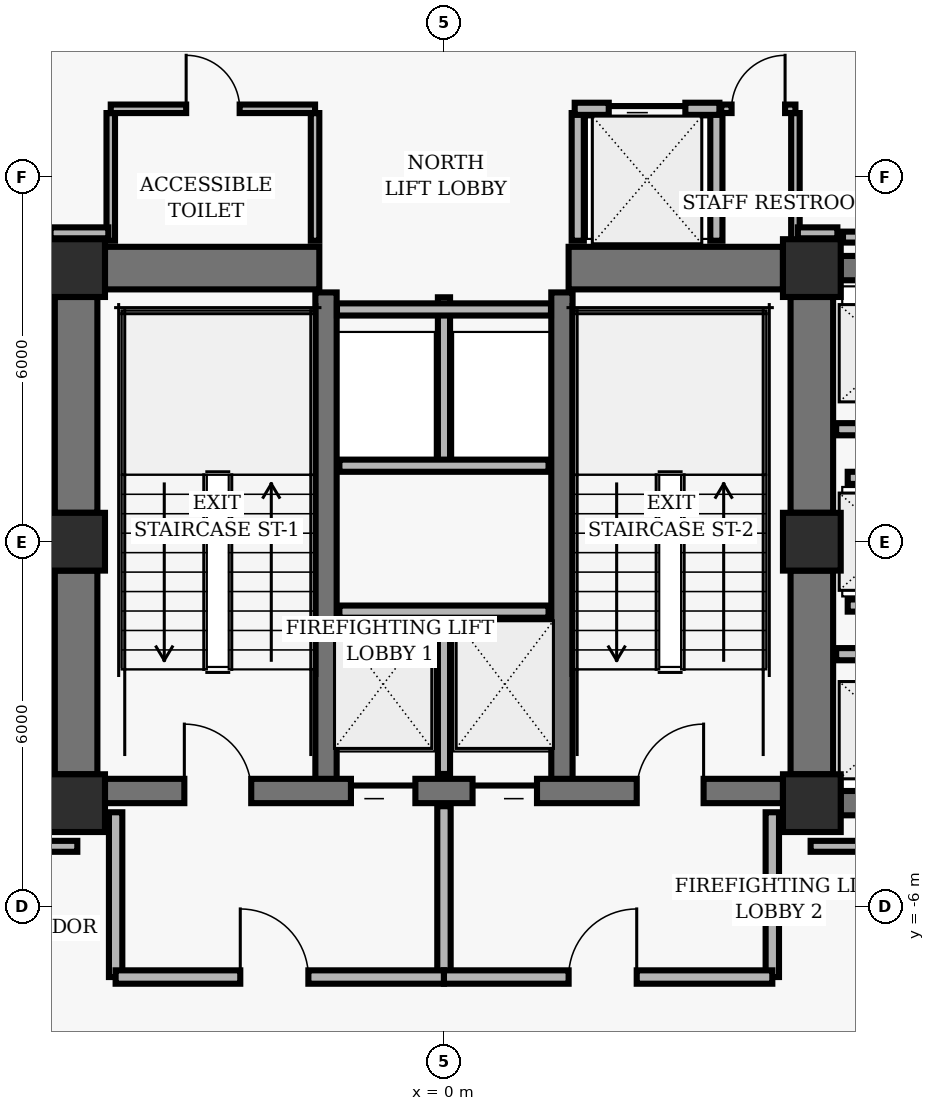
"""IFC4 building model, lengths in metres.
Left out: names, types, materials, properties, quantities, classifications, styles, units other than length and angle.
Written with IfcOpenShell. Run it as: python <this file> out.ifc"""

import sys

from ifc_helpers import new_model, si_unit, direction, frame, frame_2d, origin, origin_2d, place, context, subcontext, project, spatial, rectangle, hollow_rectangle, extrude, element, fill, save


model = new_model("IFC4")
c1 = context("Model", 3, precision=1e-05, world=origin(), true_north=direction((0.0, 1.0)))
c2 = subcontext(c1, "Body", "Model", "MODEL_VIEW")
j1 = project(units=[si_unit("LENGTHUNIT", "METRE"), si_unit("PLANEANGLEUNIT", "RADIAN")], contexts=[c1])
p1 = place(None, origin())
s1 = spatial("IfcSite", under=j1, at=p1, CompositionType="ELEMENT")
p2 = place(p1, origin())
s2 = spatial("IfcBuilding", under=s1, at=p2, CompositionType="ELEMENT")
p3 = place(p2, frame((0.0, 0.0, 100.8)))
s3 = spatial("IfcBuildingStorey", under=s2, at=p3, CompositionType="ELEMENT", Elevation=100.8)
for number, where, z_axis, x_axis in (
    (1, (-6.05, 4.5, 0.0), (0.0, 0.0, 1.0), (1.0, 0.0, 0.0)),
    (2, (6.05, 4.5, 0.0), (0.0, 0.0, 1.0), (1.0, 0.0, 0.0)),
    (3, (-6.05, 0.0, 0.0), (0.0, 0.0, 1.0), (1.0, 0.0, 0.0)),
    (4, (6.05, 0.0, 0.0), (0.0, 0.0, 1.0), (1.0, 0.0, 0.0)),
    (5, (-6.05, -4.3, 0.0), (0.0, 0.0, 1.0), (1.0, 0.0, 0.0)),
    (6, (6.05, -4.3, 0.0), (0.0, 0.0, 1.0), (1.0, 0.0, 0.0)),
):
    element("IfcColumn", number, at=place(p3, frame(where, z_axis=z_axis, x_axis=x_axis)), inside=s3, PredefinedType="COLUMN", context=c2, shape_type="SweptSolid", body=[
        extrude(hollow_rectangle(XDim=0.95, YDim=0.95, WallThickness=0.06, InnerFilletRadius=0.02, OuterFilletRadius=0.04, at=origin_2d()), origin(), (0.0, 0.0, 1.0), 3.84),
    ])
p4 = place(p3, frame((-6.05, 0.475, 0.0), z_axis=(0.0, 0.0, 1.0), x_axis=(0.0, 1.0, 0.0)))
e7 = element("IfcWall", 7, at=p4, inside=s3, PredefinedType="SHEAR", context=c2, shape_type="SweptSolid", body=[
    extrude(rectangle(XDim=3.55, YDim=0.7, at=frame_2d((1.775, 0.0))), origin(), (0.0, 0.0, 1.0), 3.418),
])
p5 = place(p3, frame((-6.05, -3.825, 0.0), z_axis=(0.0, 0.0, 1.0), x_axis=(0.0, 1.0, 0.0)))
e8 = element("IfcWall", 8, at=p5, inside=s3, PredefinedType="SHEAR", context=c2, shape_type="SweptSolid", body=[
    extrude(rectangle(XDim=3.35, YDim=0.7, at=frame_2d((1.675, 0.0))), origin(), (0.0, 0.0, 1.0), 3.418),
])
p6 = place(p3, frame((6.05, 0.475, 0.0), z_axis=(0.0, 0.0, 1.0), x_axis=(0.0, 1.0, 0.0)))
e9 = element("IfcWall", 9, at=p6, inside=s3, PredefinedType="SHEAR", context=c2, shape_type="SweptSolid", body=[
    extrude(rectangle(XDim=3.55, YDim=0.7, at=frame_2d((1.775, 0.0))), origin(), (0.0, 0.0, 1.0), 3.418),
])
p7 = place(p3, frame((6.05, -3.825, 0.0), z_axis=(0.0, 0.0, 1.0), x_axis=(0.0, 1.0, 0.0)))
e10 = element("IfcWall", 10, at=p7, inside=s3, PredefinedType="SHEAR", context=c2, shape_type="SweptSolid", body=[
    extrude(rectangle(XDim=3.35, YDim=0.7, at=frame_2d((1.675, 0.0))), origin(), (0.0, 0.0, 1.0), 3.418),
])
for number, where, z_axis, x_axis in (
    (11, (-1.94, -4.1, 0.0), (0.0, 0.0, 1.0), (0.0, 1.0, 0.0)),
    (12, (1.94, -4.1, 0.0), (0.0, 0.0, 1.0), (0.0, 1.0, 0.0)),
):
    element("IfcWall", number, at=place(p3, frame(where, z_axis=z_axis, x_axis=x_axis)), inside=s3, PredefinedType="SHEAR", context=c2, shape_type="SweptSolid", body=[
        extrude(rectangle(XDim=8.2, YDim=0.35, at=frame_2d((4.1, 0.0))), origin(), (0.0, 0.0, 1.0), 3.418),
    ])
p8 = place(p3, frame((-5.575, -4.1, 0.0), z_axis=(0.0, 0.0, 1.0), x_axis=(1.0, 0.0, 0.0)))
e13 = element("IfcWall", 13, at=p8, inside=s3, PredefinedType="SHEAR", context=c2, shape_type="SweptSolid", body=[
    extrude(rectangle(XDim=11.15, YDim=0.4, at=frame_2d((5.575, 0.0))), origin(), (0.0, 0.0, 1.0), 3.418),
])
p9 = place(p8, frame((1.305, 0.0, 0.0)))
e14 = element("IfcOpeningElement", 14, at=p9, cuts=e13, PredefinedType="OPENING", context=c2, shape_type="SweptSolid", body=[
    extrude(rectangle(XDim=1.1, YDim=2.04, at=frame_2d((0.55, 1.02))), frame((0.0, 0.21, 0.0), z_axis=(0.0, -1.0, 0.0), x_axis=(1.0, 0.0, 0.0)), (0.0, 0.0, 1.0), 0.42),
])
p10 = place(p8, frame((8.745, 0.0, 0.0)))
e15 = element("IfcOpeningElement", 15, at=p10, cuts=e13, PredefinedType="OPENING", context=c2, shape_type="SweptSolid", body=[
    extrude(rectangle(XDim=1.1, YDim=2.04, at=frame_2d((0.55, 1.02))), frame((0.0, 0.21, 0.0), z_axis=(0.0, -1.0, 0.0), x_axis=(1.0, 0.0, 0.0)), (0.0, 0.0, 1.0), 0.42),
])
p11 = place(p8, frame((4.045, 0.0, 0.0)))
e16 = element("IfcOpeningElement", 16, at=p11, cuts=e13, PredefinedType="OPENING", context=c2, shape_type="SweptSolid", body=[
    extrude(rectangle(XDim=1.06, YDim=2.04, at=frame_2d((0.53, 1.02))), frame((0.0, 0.21, 0.0), z_axis=(0.0, -1.0, 0.0), x_axis=(1.0, 0.0, 0.0)), (0.0, 0.0, 1.0), 0.42),
])
p12 = place(p8, frame((6.045, 0.0, 0.0)))
e17 = element("IfcOpeningElement", 17, at=p12, cuts=e13, PredefinedType="OPENING", context=c2, shape_type="SweptSolid", body=[
    extrude(rectangle(XDim=1.06, YDim=2.04, at=frame_2d((0.53, 1.02))), frame((0.0, 0.21, 0.0), z_axis=(0.0, -1.0, 0.0), x_axis=(1.0, 0.0, 0.0)), (0.0, 0.0, 1.0), 0.42),
])
for number, where, z_axis, x_axis in (
    (18, (-5.575, 4.5, 0.0), (0.0, 0.0, 1.0), (1.0, 0.0, 0.0)),
    (19, (2.05, 4.5, 0.0), (0.0, 0.0, 1.0), (1.0, 0.0, 0.0)),
):
    element("IfcWall", number, at=place(p3, frame(where, z_axis=z_axis, x_axis=x_axis)), inside=s3, PredefinedType="SHEAR", context=c2, shape_type="SweptSolid", body=[
        extrude(rectangle(XDim=3.525, YDim=0.7, at=frame_2d((1.762, 0.0))), origin(), (0.0, 0.0, 1.0), 3.418),
    ])
for number, where, z_axis, x_axis in (
    (20, (6.525, 4.5, 0.0), (0.0, 0.0, 1.0), (1.0, 0.0, 0.0)),
    (21, (6.525, -4.3, 0.0), (0.0, 0.0, 1.0), (1.0, 0.0, 0.0)),
):
    element("IfcWall", number, at=place(p3, frame(where, z_axis=z_axis, x_axis=x_axis)), inside=s3, PredefinedType="SHEAR", context=c2, shape_type="SweptSolid", body=[
        extrude(rectangle(XDim=1.95, YDim=0.4, at=frame_2d((0.975, 0.0))), origin(), (0.0, 0.0, 1.0), 3.418),
    ])
p13 = place(p3, frame((0.0, -3.82, 0.0), z_axis=(0.0, 0.0, 1.0), x_axis=(0.0, 1.0, 0.0)))
e22 = element("IfcWall", 22, at=p13, inside=s3, PredefinedType="PARTITIONING", context=c2, shape_type="SweptSolid", body=[
    extrude(rectangle(XDim=2.67, YDim=0.2, at=frame_2d((1.335, 0.0))), origin(), (0.0, 0.0, 1.0), 3.393),
])
p14 = place(p3, frame((-1.72, -1.15, 0.0), z_axis=(0.0, 0.0, 1.0), x_axis=(1.0, 0.0, 0.0)))
e23 = element("IfcWall", 23, at=p14, inside=s3, PredefinedType="PARTITIONING", context=c2, shape_type="SweptSolid", body=[
    extrude(rectangle(XDim=3.44, YDim=0.2, at=frame_2d((1.72, 0.0))), origin(), (0.0, 0.0, 1.0), 3.393),
])
for number, where, z_axis, x_axis in (
    (24, (-5.4, -7.16, 0.0), (0.0, 0.0, 1.0), (0.0, 1.0, 0.0)),
    (25, (5.4, -7.16, 0.0), (0.0, 0.0, 1.0), (0.0, 1.0, 0.0)),
):
    element("IfcWall", number, at=place(p3, frame(where, z_axis=z_axis, x_axis=x_axis)), inside=s3, PredefinedType="PARTITIONING", context=c2, shape_type="SweptSolid", body=[
        extrude(rectangle(XDim=2.71, YDim=0.22, at=frame_2d((1.355, 0.0))), origin(), (0.0, 0.0, 1.0), 3.393),
    ])
p15 = place(p3, frame((0.0, -7.16, 0.0), z_axis=(0.0, 0.0, 1.0), x_axis=(0.0, 1.0, 0.0)))
e26 = element("IfcWall", 26, at=p15, inside=s3, PredefinedType="PARTITIONING", context=c2, shape_type="SweptSolid", body=[
    extrude(rectangle(XDim=2.81, YDim=0.22, at=frame_2d((1.405, 0.0))), origin(), (0.0, 0.0, 1.0), 3.393),
])
p16 = place(p3, frame((-5.4, -7.16, 0.0), z_axis=(0.0, 0.0, 1.0), x_axis=(1.0, 0.0, 0.0)))
e27 = element("IfcWall", 27, at=p16, inside=s3, PredefinedType="PARTITIONING", context=c2, shape_type="SweptSolid", body=[
    extrude(rectangle(XDim=5.4, YDim=0.22, at=frame_2d((2.7, 0.0))), origin(), (0.0, 0.0, 1.0), 2.907),
])
p17 = place(p16, frame((2.05, 0.0, 0.0)))
e28 = element("IfcOpeningElement", 28, at=p17, cuts=e27, PredefinedType="OPENING", context=c2, shape_type="SweptSolid", body=[
    extrude(rectangle(XDim=1.12, YDim=2.02, at=frame_2d((0.56, 1.01))), frame((0.0, 0.12, 0.0), z_axis=(0.0, -1.0, 0.0), x_axis=(1.0, 0.0, 0.0)), (0.0, 0.0, 1.0), 0.24),
])
p18 = place(p3, frame((0.0, -7.16, 0.0), z_axis=(0.0, 0.0, 1.0), x_axis=(1.0, 0.0, 0.0)))
e29 = element("IfcWall", 29, at=p18, inside=s3, PredefinedType="PARTITIONING", context=c2, shape_type="SweptSolid", body=[
    extrude(rectangle(XDim=5.4, YDim=0.22, at=frame_2d((2.7, 0.0))), origin(), (0.0, 0.0, 1.0), 2.907),
])
p19 = place(p18, frame((2.05, 0.0, 0.0)))
e30 = element("IfcOpeningElement", 30, at=p19, cuts=e29, PredefinedType="OPENING", context=c2, shape_type="SweptSolid", body=[
    extrude(rectangle(XDim=1.12, YDim=2.02, at=frame_2d((0.56, 1.01))), frame((0.0, 0.12, 0.0), z_axis=(0.0, -1.0, 0.0), x_axis=(1.0, 0.0, 0.0)), (0.0, 0.0, 1.0), 0.24),
])
p20 = place(p3, frame((0.0, 1.25, 0.0), z_axis=(0.0, 0.0, 1.0), x_axis=(0.0, 1.0, 0.0)))
e31 = element("IfcWall", 31, at=p20, inside=s3, PredefinedType="PARTITIONING", context=c2, shape_type="SweptSolid", body=[
    extrude(rectangle(XDim=2.77, YDim=0.2, at=frame_2d((1.385, 0.0))), origin(), (0.0, 0.0, 1.0), 3.393),
])
p21 = place(p3, frame((-1.72, 1.25, 0.0), z_axis=(0.0, 0.0, 1.0), x_axis=(1.0, 0.0, 0.0)))
e32 = element("IfcWall", 32, at=p21, inside=s3, PredefinedType="PARTITIONING", context=c2, shape_type="SweptSolid", body=[
    extrude(rectangle(XDim=3.44, YDim=0.2, at=frame_2d((1.72, 0.0))), origin(), (0.0, 0.0, 1.0), 3.393),
])
p22 = place(p3, frame((-1.76, 3.82, 0.0), z_axis=(0.0, 0.0, 1.0), x_axis=(1.0, 0.0, 0.0)))
e33 = element("IfcWall", 33, at=p22, inside=s3, PredefinedType="PARTITIONING", context=c2, shape_type="SweptSolid", body=[
    extrude(rectangle(XDim=3.52, YDim=0.2, at=frame_2d((1.76, 0.0))), origin(), (0.0, 0.0, 1.0), 3.393),
])
for number, where, z_axis, x_axis in (
    (34, (2.2, 4.95, 0.0), (0.0, 0.0, 1.0), (0.0, 1.0, 0.0)),
    (35, (4.48, 4.95, 0.0), (0.0, 0.0, 1.0), (0.0, 1.0, 0.0)),
):
    element("IfcWall", number, at=place(p3, frame(where, z_axis=z_axis, x_axis=x_axis)), inside=s3, PredefinedType="PARTITIONING", context=c2, shape_type="SweptSolid", body=[
        extrude(rectangle(XDim=2.1, YDim=0.2, at=frame_2d((1.05, 0.0))), origin(), (0.0, 0.0, 1.0), 3.393),
    ])
p23 = place(p3, frame((2.15, 7.12, 0.0), z_axis=(0.0, 0.0, 1.0), x_axis=(1.0, 0.0, 0.0)))
e36 = element("IfcWall", 36, at=p23, inside=s3, PredefinedType="PARTITIONING", context=c2, shape_type="SweptSolid", body=[
    extrude(rectangle(XDim=2.38, YDim=0.2, at=frame_2d((1.19, 0.0))), origin(), (0.0, 0.0, 1.0), 3.393),
])
p24 = place(p23, frame((0.56, 0.0, 0.0)))
e37 = element("IfcOpeningElement", 37, at=p24, cuts=e36, PredefinedType="OPENING", context=c2, shape_type="SweptSolid", body=[
    extrude(rectangle(XDim=1.26, YDim=2.06, at=frame_2d((0.63, 1.03))), frame((0.0, 0.11, 0.0), z_axis=(0.0, -1.0, 0.0), x_axis=(1.0, 0.0, 0.0)), (0.0, 0.0, 1.0), 0.22),
])
for number, where, z_axis, x_axis in (
    (38, (-5.48, 4.95, 0.0), (0.0, 0.0, 1.0), (0.0, 1.0, 0.0)),
    (39, (-2.12, 4.95, 0.0), (0.0, 0.0, 1.0), (0.0, 1.0, 0.0)),
):
    element("IfcWall", number, at=place(p3, frame(where, z_axis=z_axis, x_axis=x_axis)), inside=s3, PredefinedType="PARTITIONING", context=c2, shape_type="SweptSolid", body=[
        extrude(rectangle(XDim=2.1, YDim=0.14, at=frame_2d((1.05, 0.0))), origin(), (0.0, 0.0, 1.0), 3.393),
    ])
p25 = place(p3, frame((-5.48, 7.12, 0.0), z_axis=(0.0, 0.0, 1.0), x_axis=(1.0, 0.0, 0.0)))
e40 = element("IfcWall", 40, at=p25, inside=s3, PredefinedType="PARTITIONING", context=c2, shape_type="SweptSolid", body=[
    extrude(rectangle(XDim=3.36, YDim=0.14, at=frame_2d((1.68, 0.0))), origin(), (0.0, 0.0, 1.0), 3.393),
])
p26 = place(p25, frame((1.24, 0.0, 0.0)))
e41 = element("IfcOpeningElement", 41, at=p26, cuts=e40, PredefinedType="OPENING", context=c2, shape_type="SweptSolid", body=[
    extrude(rectangle(XDim=0.88, YDim=2.02, at=frame_2d((0.44, 1.01))), frame((0.0, 0.08, 0.0), z_axis=(0.0, -1.0, 0.0), x_axis=(1.0, 0.0, 0.0)), (0.0, 0.0, 1.0), 0.16),
])
p27 = place(p3, frame((5.78, 4.95, 0.0), z_axis=(0.0, 0.0, 1.0), x_axis=(0.0, 1.0, 0.0)))
e42 = element("IfcWall", 42, at=p27, inside=s3, PredefinedType="PARTITIONING", context=c2, shape_type="SweptSolid", body=[
    extrude(rectangle(XDim=2.1, YDim=0.14, at=frame_2d((1.05, 0.0))), origin(), (0.0, 0.0, 1.0), 3.393),
])
p28 = place(p3, frame((4.56, 7.12, 0.0), z_axis=(0.0, 0.0, 1.0), x_axis=(1.0, 0.0, 0.0)))
e43 = element("IfcWall", 43, at=p28, inside=s3, PredefinedType="PARTITIONING", context=c2, shape_type="SweptSolid", body=[
    extrude(rectangle(XDim=1.22, YDim=0.14, at=frame_2d((0.61, 0.0))), origin(), (0.0, 0.0, 1.0), 3.393),
])
p29 = place(p28, frame((0.17, 0.0, 0.0)))
e44 = element("IfcOpeningElement", 44, at=p29, cuts=e43, PredefinedType="OPENING", context=c2, shape_type="SweptSolid", body=[
    extrude(rectangle(XDim=0.88, YDim=2.02, at=frame_2d((0.44, 1.01))), frame((0.0, 0.08, 0.0), z_axis=(0.0, -1.0, 0.0), x_axis=(1.0, 0.0, 0.0)), (0.0, 0.0, 1.0), 0.16),
])
for number, where, z_axis, x_axis in (
    (45, (6.45, -1.85, 0.0), (0.0, 0.0, 1.0), (1.0, 0.0, 0.0)),
    (46, (6.45, 1.85, 0.0), (0.0, 0.0, 1.0), (1.0, 0.0, 0.0)),
):
    element("IfcWall", number, at=place(p3, frame(where, z_axis=z_axis, x_axis=x_axis)), inside=s3, PredefinedType="PARTITIONING", context=c2, shape_type="SweptSolid", body=[
        extrude(rectangle(XDim=2.1, YDim=0.2, at=frame_2d((1.05, 0.0))), origin(), (0.0, 0.0, 1.0), 3.393),
    ])
for number, where, z_axis, x_axis in (
    (47, (6.64, -1.05, 0.0), (0.0, 0.0, 1.0), (1.0, 0.0, 0.0)),
    (48, (6.64, 1.05, 0.0), (0.0, 0.0, 1.0), (1.0, 0.0, 0.0)),
):
    element("IfcWall", number, at=place(p3, frame(where, z_axis=z_axis, x_axis=x_axis)), inside=s3, PredefinedType="PARTITIONING", context=c2, shape_type="SweptSolid", body=[
        extrude(rectangle(XDim=1.91, YDim=0.2, at=frame_2d((0.955, 0.0))), origin(), (0.0, 0.0, 1.0), 3.393),
    ])
p30 = place(p3, frame((11.467, -5.14, 0.0), z_axis=(0.0, 0.0, 1.0), x_axis=(-0.746516597114, -0.665366793756, 0.0)))
e49 = element("IfcWall", 49, at=p30, inside=s3, PredefinedType="PARTITIONING", context=c2, shape_type="SweptSolid", body=[
    extrude(rectangle(XDim=6.342, YDim=0.18, at=frame_2d((3.171, 0.0))), origin(), (0.0, 0.0, 1.0), 3.393),
])
p31 = place(p30, frame((3.445, 0.0, 0.0)))
e50 = element("IfcOpeningElement", 50, at=p31, cuts=e49, PredefinedType="OPENING", context=c2, shape_type="SweptSolid", body=[
    extrude(rectangle(XDim=0.96, YDim=2.02, at=frame_2d((0.48, 1.01))), frame((0.0, 0.1, 0.0), z_axis=(0.0, -1.0, 0.0), x_axis=(1.0, 0.0, 0.0)), (0.0, 0.0, 1.0), 0.2),
])
for number, where, z_axis, x_axis in (
    (51, (-9.37, -5.01, 0.0), (0.0, 0.0, 1.0), (1.0, 0.0, 0.0)),
    (52, (6.03, -5.01, 0.0), (0.0, 0.0, 1.0), (1.0, 0.0, 0.0)),
):
    element("IfcWall", number, at=place(p3, frame(where, z_axis=z_axis, x_axis=x_axis)), inside=s3, PredefinedType="PARTITIONING", context=c2, shape_type="SweptSolid", body=[
        extrude(rectangle(XDim=3.34, YDim=0.18, at=frame_2d((1.67, 0.0))), origin(), (0.0, 0.0, 1.0), 3.393),
    ])
p32 = place(p3, frame((9.37, 5.01, 0.0), z_axis=(0.0, 0.0, 1.0), x_axis=(-1.0, 0.0, 0.0)))
e53 = element("IfcWall", 53, at=p32, inside=s3, PredefinedType="PARTITIONING", context=c2, shape_type="SweptSolid", body=[
    extrude(rectangle(XDim=2.808, YDim=0.18, at=frame_2d((1.404, 0.0))), origin(), (0.0, 0.0, 1.0), 3.393),
])
p33 = place(p3, frame((6.47, 5.08, 0.0), z_axis=(0.0, 0.0, 1.0), x_axis=(-1.0, 0.0, 0.0)))
e54 = element("IfcWall", 54, at=p33, inside=s3, PredefinedType="PARTITIONING", context=c2, shape_type="SweptSolid", body=[
    extrude(rectangle(XDim=0.65, YDim=0.18, at=frame_2d((0.325, 0.0))), origin(), (0.0, 0.0, 1.0), 3.393),
])
p34 = place(p3, frame((-5.52, 5.08, 0.0), z_axis=(0.0, 0.0, 1.0), x_axis=(-1.0, 0.0, 0.0)))
e55 = element("IfcWall", 55, at=p34, inside=s3, PredefinedType="PARTITIONING", context=c2, shape_type="SweptSolid", body=[
    extrude(rectangle(XDim=0.95, YDim=0.18, at=frame_2d((0.475, 0.0))), origin(), (0.0, 0.0, 1.0), 3.393),
])
p35 = place(p9, origin())
e56 = element("IfcDoor", 56, at=p35, inside=s3, OperationType="SINGLE_SWING_LEFT", PredefinedType="DOOR", context=c2, shape_type="SweptSolid", body=[
    extrude(rectangle(XDim=1.1, YDim=2.04, at=frame_2d((0.55, 1.02))), frame((0.0, 0.025, 0.0), z_axis=(0.0, -1.0, 0.0), x_axis=(1.0, 0.0, 0.0)), (0.0, 0.0, 1.0), 0.05),
])
fill(e14, e56)
p36 = place(p10, origin())
e57 = element("IfcDoor", 57, at=p36, inside=s3, OperationType="SINGLE_SWING_RIGHT", PredefinedType="DOOR", context=c2, shape_type="SweptSolid", body=[
    extrude(rectangle(XDim=1.1, YDim=2.04, at=frame_2d((0.55, 1.02))), frame((0.0, 0.025, 0.0), z_axis=(0.0, -1.0, 0.0), x_axis=(1.0, 0.0, 0.0)), (0.0, 0.0, 1.0), 0.05),
])
fill(e15, e57)
p37 = place(p11, origin())
e58 = element("IfcDoor", 58, at=p37, inside=s3, OperationType="SLIDING_TO_LEFT", PredefinedType="DOOR", context=c2, shape_type="SweptSolid", body=[
    extrude(rectangle(XDim=1.06, YDim=2.04, at=frame_2d((0.53, 1.02))), frame((0.0, 0.025, 0.0), z_axis=(0.0, -1.0, 0.0), x_axis=(1.0, 0.0, 0.0)), (0.0, 0.0, 1.0), 0.05),
])
fill(e16, e58)
p38 = place(p12, origin())
e59 = element("IfcDoor", 59, at=p38, inside=s3, OperationType="SLIDING_TO_RIGHT", PredefinedType="DOOR", context=c2, shape_type="SweptSolid", body=[
    extrude(rectangle(XDim=1.06, YDim=2.04, at=frame_2d((0.53, 1.02))), frame((0.0, 0.025, 0.0), z_axis=(0.0, -1.0, 0.0), x_axis=(1.0, 0.0, 0.0)), (0.0, 0.0, 1.0), 0.05),
])
fill(e17, e59)
p39 = place(p17, origin())
e60 = element("IfcDoor", 60, at=p39, inside=s3, OperationType="SINGLE_SWING_LEFT", PredefinedType="DOOR", context=c2, shape_type="SweptSolid", body=[
    extrude(rectangle(XDim=1.12, YDim=2.02, at=frame_2d((0.56, 1.01))), frame((0.0, 0.025, 0.0), z_axis=(0.0, -1.0, 0.0), x_axis=(1.0, 0.0, 0.0)), (0.0, 0.0, 1.0), 0.05),
])
fill(e28, e60)
p40 = place(p19, origin())
e61 = element("IfcDoor", 61, at=p40, inside=s3, OperationType="SINGLE_SWING_RIGHT", PredefinedType="DOOR", context=c2, shape_type="SweptSolid", body=[
    extrude(rectangle(XDim=1.12, YDim=2.02, at=frame_2d((0.56, 1.01))), frame((0.0, 0.025, 0.0), z_axis=(0.0, -1.0, 0.0), x_axis=(1.0, 0.0, 0.0)), (0.0, 0.0, 1.0), 0.05),
])
fill(e30, e61)
p41 = place(p24, origin())
e62 = element("IfcDoor", 62, at=p41, inside=s3, OperationType="SLIDING_TO_LEFT", PredefinedType="DOOR", context=c2, shape_type="SweptSolid", body=[
    extrude(rectangle(XDim=1.26, YDim=2.06, at=frame_2d((0.63, 1.03))), frame((0.0, 0.025, 0.0), z_axis=(0.0, -1.0, 0.0), x_axis=(1.0, 0.0, 0.0)), (0.0, 0.0, 1.0), 0.05),
])
fill(e37, e62)
p42 = place(p26, origin())
e63 = element("IfcDoor", 63, at=p42, inside=s3, OperationType="SINGLE_SWING_LEFT", PredefinedType="DOOR", context=c2, shape_type="SweptSolid", body=[
    extrude(rectangle(XDim=0.88, YDim=2.02, at=frame_2d((0.44, 1.01))), frame((0.0, 0.025, 0.0), z_axis=(0.0, -1.0, 0.0), x_axis=(1.0, 0.0, 0.0)), (0.0, 0.0, 1.0), 0.05),
])
fill(e41, e63)
p43 = place(p29, origin())
e64 = element("IfcDoor", 64, at=p43, inside=s3, OperationType="SINGLE_SWING_RIGHT", PredefinedType="DOOR", context=c2, shape_type="SweptSolid", body=[
    extrude(rectangle(XDim=0.88, YDim=2.02, at=frame_2d((0.44, 1.01))), frame((0.0, 0.025, 0.0), z_axis=(0.0, -1.0, 0.0), x_axis=(1.0, 0.0, 0.0)), (0.0, 0.0, 1.0), 0.05),
])
fill(e44, e64)
save(model, sys.argv[1])
